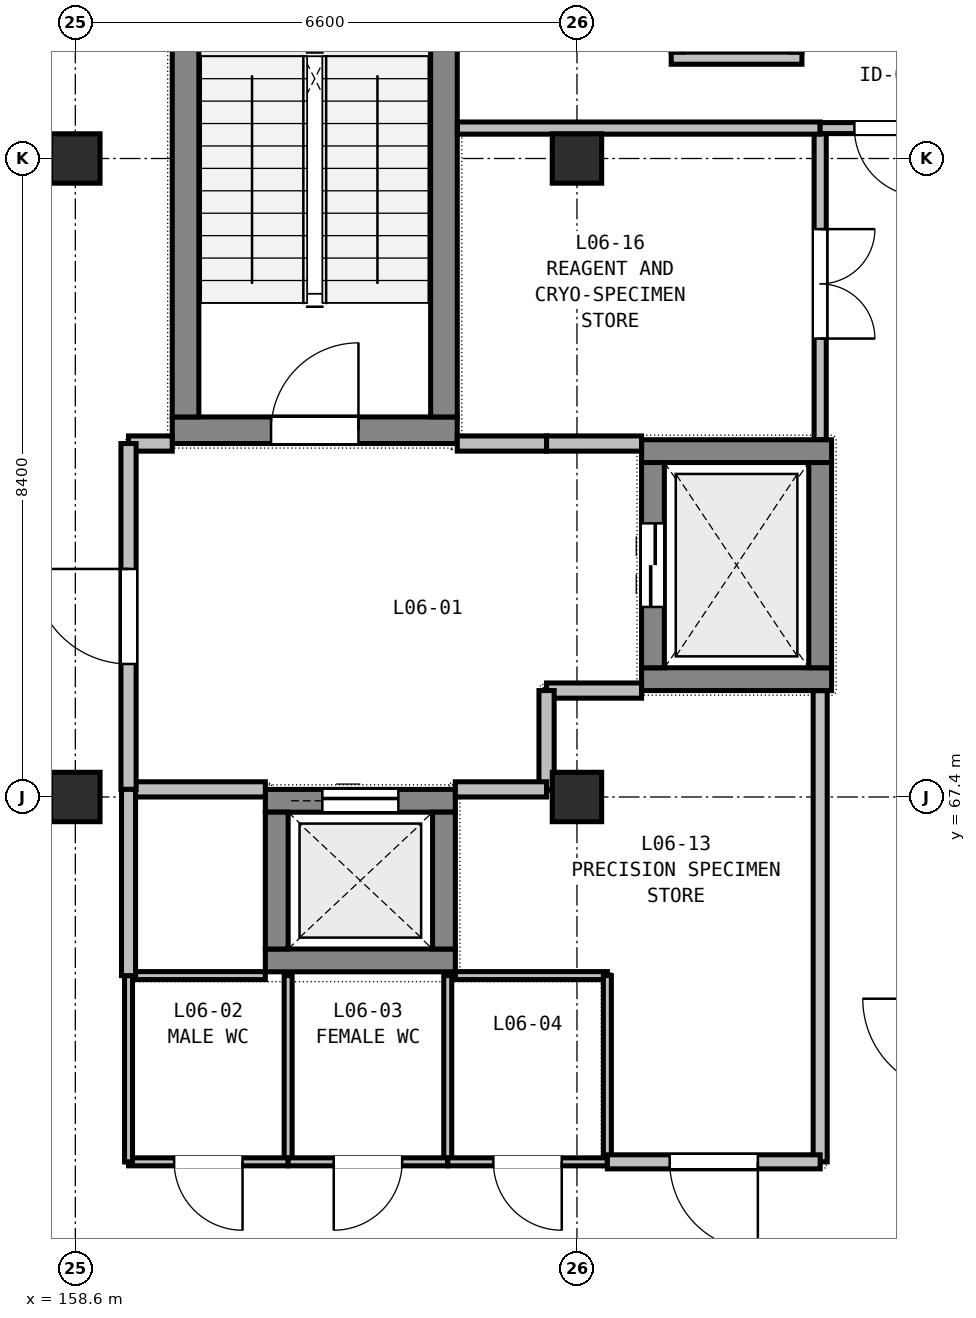
"""IFC4 building model, lengths in metres.
Left out: names, types, materials, properties, quantities, classifications, styles, units other than length and angle.
Written with IfcOpenShell. Run it as: python <this file> out.ifc"""

import sys

from ifc_helpers import new_model, si_unit, direction, frame, frame_2d, origin, origin_2d, place, context, subcontext, project, spatial, rectangle, extrude, element, fill, save


model = new_model("IFC4")
c1 = context("Model", 3, precision=1e-05, world=origin(), true_north=direction((0.0, 1.0)))
c2 = subcontext(c1, "Body", "Model", "MODEL_VIEW")
j1 = project(units=[si_unit("LENGTHUNIT", "METRE"), si_unit("PLANEANGLEUNIT", "RADIAN")], contexts=[c1])
p1 = place(None, origin())
s1 = spatial("IfcSite", under=j1, at=p1, CompositionType="ELEMENT")
p2 = place(p1, origin())
s2 = spatial("IfcBuilding", under=s1, at=p2, CompositionType="ELEMENT")
p3 = place(p2, frame((0.0, 0.0, 28.5)))
s3 = spatial("IfcBuildingStorey", under=s2, at=p3, CompositionType="ELEMENT", Elevation=28.5)
for number, where, z_axis, x_axis in (
    (1, (158.6, 67.4, 0.0), (0.0, 0.0, 1.0), (1.0, 0.0, 0.0)),
    (2, (158.6, 75.8, 0.0), (0.0, 0.0, 1.0), (1.0, 0.0, 0.0)),
    (3, (165.2, 67.4, 0.0), (0.0, 0.0, 1.0), (1.0, 0.0, 0.0)),
    (4, (165.2, 75.8, 0.0), (0.0, 0.0, 1.0), (1.0, 0.0, 0.0)),
):
    element("IfcColumn", number, at=place(p3, frame(where, z_axis=z_axis, x_axis=x_axis)), inside=s3, PredefinedType="COLUMN", context=c2, shape_type="SweptSolid", body=[
        extrude(rectangle(XDim=0.65, YDim=0.65, at=origin_2d()), origin(), (0.0, 0.0, 1.0), 4.2),
    ])
p4 = place(p3, frame((159.875, 72.225, 0.0), z_axis=(0.0, 0.0, 1.0), x_axis=(1.0, 0.0, 0.0)))
e5 = element("IfcWall", 5, at=p4, inside=s3, PredefinedType="SHEAR", context=c2, shape_type="SweptSolid", body=[
    extrude(rectangle(XDim=3.75, YDim=0.35, at=frame_2d((1.875, 0.0))), origin(), (0.0, 0.0, 1.0), 4.2),
])
p5 = place(p4, frame((1.3, 0.0, 0.0)))
e6 = element("IfcOpeningElement", 6, at=p5, cuts=e5, PredefinedType="OPENING", context=c2, shape_type="SweptSolid", body=[
    extrude(rectangle(XDim=1.15, YDim=2.15, at=frame_2d((0.575, 1.075))), frame((0.0, 0.185, 0.0), z_axis=(0.0, -1.0, 0.0), x_axis=(1.0, 0.0, 0.0)), (0.0, 0.0, 1.0), 0.37),
])
for number, where, z_axis, x_axis in (
    (7, (160.05, 72.4, 0.0), (0.0, 0.0, 1.0), (0.0, 1.0, 0.0)),
    (8, (163.45, 72.4, 0.0), (0.0, 0.0, 1.0), (0.0, 1.0, 0.0)),
):
    element("IfcWall", number, at=place(p3, frame(where, z_axis=z_axis, x_axis=x_axis)), inside=s3, PredefinedType="SHEAR", context=c2, shape_type="SweptSolid", body=[
        extrude(rectangle(XDim=7.375, YDim=0.35, at=frame_2d((3.688, 0.0))), origin(), (0.0, 0.0, 1.0), 4.2),
    ])
for number, where, z_axis, x_axis in (
    (9, (166.05, 68.95, 0.0), (0.0, 0.0, 1.0), (1.0, 0.0, 0.0)),
    (10, (166.05, 71.95, 0.0), (0.0, 0.0, 1.0), (1.0, 0.0, 0.0)),
):
    element("IfcWall", number, at=place(p3, frame(where, z_axis=z_axis, x_axis=x_axis)), inside=s3, PredefinedType="SHEAR", context=c2, shape_type="SweptSolid", body=[
        extrude(rectangle(XDim=2.5, YDim=0.3, at=frame_2d((1.25, 0.0))), origin(), (0.0, 0.0, 1.0), 4.2),
    ])
p6 = place(p3, frame((166.2, 69.1, 0.0), z_axis=(0.0, 0.0, 1.0), x_axis=(0.0, 1.0, 0.0)))
e11 = element("IfcWall", 11, at=p6, inside=s3, PredefinedType="SHEAR", context=c2, shape_type="SweptSolid", body=[
    extrude(rectangle(XDim=2.7, YDim=0.3, at=frame_2d((1.35, 0.0))), origin(), (0.0, 0.0, 1.0), 4.2),
])
p7 = place(p6, frame((0.8, 0.0, 0.0)))
e12 = element("IfcOpeningElement", 12, at=p7, cuts=e11, PredefinedType="OPENING", context=c2, shape_type="SweptSolid", body=[
    extrude(rectangle(XDim=1.1, YDim=2.1, at=frame_2d((0.55, 1.05))), frame((0.0, 0.16, 0.0), z_axis=(0.0, -1.0, 0.0), x_axis=(1.0, 0.0, 0.0)), (0.0, 0.0, 1.0), 0.32),
])
p8 = place(p3, frame((168.4, 69.1, 0.0), z_axis=(0.0, 0.0, 1.0), x_axis=(0.0, 1.0, 0.0)))
e13 = element("IfcWall", 13, at=p8, inside=s3, PredefinedType="SHEAR", context=c2, shape_type="SweptSolid", body=[
    extrude(rectangle(XDim=2.7, YDim=0.3, at=frame_2d((1.35, 0.0))), origin(), (0.0, 0.0, 1.0), 4.2),
])
p9 = place(p3, frame((161.1, 65.25, 0.0), z_axis=(0.0, 0.0, 1.0), x_axis=(1.0, 0.0, 0.0)))
e14 = element("IfcWall", 14, at=p9, inside=s3, PredefinedType="SHEAR", context=c2, shape_type="SweptSolid", body=[
    extrude(rectangle(XDim=2.5, YDim=0.3, at=frame_2d((1.25, 0.0))), origin(), (0.0, 0.0, 1.0), 4.2),
])
p10 = place(p3, frame((161.1, 67.35, 0.0), z_axis=(0.0, 0.0, 1.0), x_axis=(1.0, 0.0, 0.0)))
e15 = element("IfcWall", 15, at=p10, inside=s3, PredefinedType="SHEAR", context=c2, shape_type="SweptSolid", body=[
    extrude(rectangle(XDim=2.5, YDim=0.3, at=frame_2d((1.25, 0.0))), origin(), (0.0, 0.0, 1.0), 4.2),
])
p11 = place(p10, frame((0.75, 0.0, 0.0)))
e16 = element("IfcOpeningElement", 16, at=p11, cuts=e15, PredefinedType="OPENING", context=c2, shape_type="SweptSolid", body=[
    extrude(rectangle(XDim=1.0, YDim=2.1, at=frame_2d((0.5, 1.05))), frame((0.0, 0.16, 0.0), z_axis=(0.0, -1.0, 0.0), x_axis=(1.0, 0.0, 0.0)), (0.0, 0.0, 1.0), 0.32),
])
for number, where, z_axis, x_axis in (
    (17, (161.25, 65.4, 0.0), (0.0, 0.0, 1.0), (0.0, 1.0, 0.0)),
    (18, (163.45, 65.4, 0.0), (0.0, 0.0, 1.0), (0.0, 1.0, 0.0)),
):
    element("IfcWall", number, at=place(p3, frame(where, z_axis=z_axis, x_axis=x_axis)), inside=s3, PredefinedType="SHEAR", context=c2, shape_type="SweptSolid", body=[
        extrude(rectangle(XDim=1.8, YDim=0.3, at=frame_2d((0.9, 0.0))), origin(), (0.0, 0.0, 1.0), 4.2),
    ])
p12 = place(p3, frame((166.44, 77.12, 0.0), z_axis=(0.0, 0.0, 1.0), x_axis=(1.0, 0.0, 0.0)))
e19 = element("IfcWall", 19, at=p12, inside=s3, PredefinedType="PARTITIONING", context=c2, shape_type="SweptSolid", body=[
    extrude(rectangle(XDim=1.72, YDim=0.16, at=frame_2d((0.86, 0.0))), origin(), (0.0, 0.0, 1.0), 3.915),
])
p13 = place(p3, frame((159.3, 72.05, 0.0), z_axis=(0.0, 0.0, 1.0), x_axis=(1.0, 0.0, 0.0)))
e20 = element("IfcWall", 20, at=p13, inside=s3, PredefinedType="PARTITIONING", context=c2, shape_type="SweptSolid", body=[
    extrude(rectangle(XDim=0.575, YDim=0.2, at=frame_2d((0.288, 0.0))), origin(), (0.0, 0.0, 1.0), 3.915),
])
p14 = place(p3, frame((163.625, 72.05, 0.0), z_axis=(0.0, 0.0, 1.0), x_axis=(1.0, 0.0, 0.0)))
e21 = element("IfcWall", 21, at=p14, inside=s3, PredefinedType="PARTITIONING", context=c2, shape_type="SweptSolid", body=[
    extrude(rectangle(XDim=1.175, YDim=0.2, at=frame_2d((0.587, 0.0))), origin(), (0.0, 0.0, 1.0), 3.915),
])
for number, where, z_axis, x_axis in (
    (22, (164.8, 72.05, 0.0), (0.0, 0.0, 1.0), (1.0, 0.0, 0.0)),
    (23, (166.05, 68.8, 0.0), (0.0, 0.0, 1.0), (-1.0, 0.0, 0.0)),
):
    element("IfcWall", number, at=place(p3, frame(where, z_axis=z_axis, x_axis=x_axis)), inside=s3, PredefinedType="PARTITIONING", context=c2, shape_type="SweptSolid", body=[
        extrude(rectangle(XDim=1.25, YDim=0.2, at=frame_2d((0.625, 0.0))), origin(), (0.0, 0.0, 1.0), 3.435),
    ])
p15 = place(p3, frame((164.8, 68.8, 0.0), z_axis=(0.0, 0.0, 1.0), x_axis=(0.0, -1.0, 0.0)))
e24 = element("IfcWall", 24, at=p15, inside=s3, PredefinedType="PARTITIONING", context=c2, shape_type="SweptSolid", body=[
    extrude(rectangle(XDim=1.3, YDim=0.2, at=frame_2d((0.65, 0.0))), origin(), (0.0, 0.0, 1.0), 3.585),
])
p16 = place(p3, frame((164.8, 67.5, 0.0), z_axis=(0.0, 0.0, 1.0), x_axis=(-1.0, 0.0, 0.0)))
e25 = element("IfcWall", 25, at=p16, inside=s3, PredefinedType="PARTITIONING", context=c2, shape_type="SweptSolid", body=[
    extrude(rectangle(XDim=1.2, YDim=0.2, at=frame_2d((0.6, 0.0))), origin(), (0.0, 0.0, 1.0), 3.585),
])
p17 = place(p3, frame((161.1, 67.5, 0.0), z_axis=(0.0, 0.0, 1.0), x_axis=(-1.0, 0.0, 0.0)))
e26 = element("IfcWall", 26, at=p17, inside=s3, PredefinedType="PARTITIONING", context=c2, shape_type="SweptSolid", body=[
    extrude(rectangle(XDim=1.8, YDim=0.2, at=frame_2d((0.9, 0.0))), origin(), (0.0, 0.0, 1.0), 3.585),
])
p18 = place(p3, frame((159.3, 67.5, 0.0), z_axis=(0.0, 0.0, 1.0), x_axis=(0.0, 1.0, 0.0)))
e27 = element("IfcWall", 27, at=p18, inside=s3, PredefinedType="PARTITIONING", context=c2, shape_type="SweptSolid", body=[
    extrude(rectangle(XDim=4.55, YDim=0.2, at=frame_2d((2.275, 0.0))), origin(), (0.0, 0.0, 1.0), 3.585),
])
p19 = place(p18, frame((1.65, 0.0, 0.0)))
e28 = element("IfcOpeningElement", 28, at=p19, cuts=e27, PredefinedType="OPENING", context=c2, shape_type="SweptSolid", body=[
    extrude(rectangle(XDim=1.25, YDim=2.15, at=frame_2d((0.625, 1.075))), frame((0.0, 0.11, 0.0), z_axis=(0.0, -1.0, 0.0), x_axis=(1.0, 0.0, 0.0)), (0.0, 0.0, 1.0), 0.22),
])
p20 = place(p3, frame((159.3, 65.05, 0.0), z_axis=(0.0, 0.0, 1.0), x_axis=(1.0, 0.0, 0.0)))
e29 = element("IfcWall", 29, at=p20, inside=s3, PredefinedType="PARTITIONING", context=c2, shape_type="SweptSolid", body=[
    extrude(rectangle(XDim=1.8, YDim=0.105, at=frame_2d((0.9, 0.0))), origin(), (0.0, 0.0, 1.0), 3.915),
])
p21 = place(p3, frame((161.4, 65.05, 0.0), z_axis=(0.0, 0.0, 1.0), x_axis=(0.0, -1.0, 0.0)))
e30 = element("IfcWall", 30, at=p21, inside=s3, PredefinedType="PARTITIONING", context=c2, shape_type="SweptSolid", body=[
    extrude(rectangle(XDim=2.45, YDim=0.105, at=frame_2d((1.225, 0.0))), origin(), (0.0, 0.0, 1.0), 3.915),
])
p22 = place(p3, frame((161.4, 62.6, 0.0), z_axis=(0.0, 0.0, 1.0), x_axis=(-1.0, 0.0, 0.0)))
e31 = element("IfcWall", 31, at=p22, inside=s3, PredefinedType="PARTITIONING", context=c2, shape_type="SweptSolid", body=[
    extrude(rectangle(XDim=2.1, YDim=0.105, at=frame_2d((1.05, 0.0))), origin(), (0.0, 0.0, 1.0), 3.915),
])
p23 = place(p22, frame((0.6, 0.0, 0.0)))
e32 = element("IfcOpeningElement", 32, at=p23, cuts=e31, PredefinedType="OPENING", context=c2, shape_type="SweptSolid", body=[
    extrude(rectangle(XDim=0.9, YDim=2.02, at=frame_2d((0.45, 1.01))), frame((0.0, 0.062, 0.0), z_axis=(0.0, -1.0, 0.0), x_axis=(1.0, 0.0, 0.0)), (0.0, 0.0, 1.0), 0.125),
])
for number, where, z_axis, x_axis in (
    (33, (159.3, 62.6, 0.0), (0.0, 0.0, 1.0), (0.0, 1.0, 0.0)),
    (34, (163.5, 65.05, 0.0), (0.0, 0.0, 1.0), (0.0, -1.0, 0.0)),
):
    element("IfcWall", number, at=place(p3, frame(where, z_axis=z_axis, x_axis=x_axis)), inside=s3, PredefinedType="PARTITIONING", context=c2, shape_type="SweptSolid", body=[
        extrude(rectangle(XDim=2.45, YDim=0.105, at=frame_2d((1.225, 0.0))), origin(), (0.0, 0.0, 1.0), 3.915),
    ])
p24 = place(p3, frame((163.5, 62.6, 0.0), z_axis=(0.0, 0.0, 1.0), x_axis=(-1.0, 0.0, 0.0)))
e35 = element("IfcWall", 35, at=p24, inside=s3, PredefinedType="PARTITIONING", context=c2, shape_type="SweptSolid", body=[
    extrude(rectangle(XDim=2.1, YDim=0.105, at=frame_2d((1.05, 0.0))), origin(), (0.0, 0.0, 1.0), 3.915),
])
p25 = place(p24, frame((0.6, 0.0, 0.0)))
e36 = element("IfcOpeningElement", 36, at=p25, cuts=e35, PredefinedType="OPENING", context=c2, shape_type="SweptSolid", body=[
    extrude(rectangle(XDim=0.9, YDim=2.02, at=frame_2d((0.45, 1.01))), frame((0.0, 0.062, 0.0), z_axis=(0.0, -1.0, 0.0), x_axis=(1.0, 0.0, 0.0)), (0.0, 0.0, 1.0), 0.125),
])
p26 = place(p3, frame((163.6, 65.05, 0.0), z_axis=(0.0, 0.0, 1.0), x_axis=(1.0, 0.0, 0.0)))
e37 = element("IfcWall", 37, at=p26, inside=s3, PredefinedType="PARTITIONING", context=c2, shape_type="SweptSolid", body=[
    extrude(rectangle(XDim=2.0, YDim=0.105, at=frame_2d((1.0, 0.0))), origin(), (0.0, 0.0, 1.0), 3.435),
])
p27 = place(p3, frame((165.6, 65.05, 0.0), z_axis=(0.0, 0.0, 1.0), x_axis=(0.0, -1.0, 0.0)))
e38 = element("IfcWall", 38, at=p27, inside=s3, PredefinedType="PARTITIONING", context=c2, shape_type="SweptSolid", body=[
    extrude(rectangle(XDim=2.45, YDim=0.105, at=frame_2d((1.225, 0.0))), origin(), (0.0, 0.0, 1.0), 3.915),
])
p28 = place(p3, frame((165.6, 62.6, 0.0), z_axis=(0.0, 0.0, 1.0), x_axis=(-1.0, 0.0, 0.0)))
e39 = element("IfcWall", 39, at=p28, inside=s3, PredefinedType="PARTITIONING", context=c2, shape_type="SweptSolid", body=[
    extrude(rectangle(XDim=2.1, YDim=0.105, at=frame_2d((1.05, 0.0))), origin(), (0.0, 0.0, 1.0), 3.435),
])
p29 = place(p28, frame((0.6, 0.0, 0.0)))
e40 = element("IfcOpeningElement", 40, at=p29, cuts=e39, PredefinedType="OPENING", context=c2, shape_type="SweptSolid", body=[
    extrude(rectangle(XDim=0.9, YDim=2.02, at=frame_2d((0.45, 1.01))), frame((0.0, 0.062, 0.0), z_axis=(0.0, -1.0, 0.0), x_axis=(1.0, 0.0, 0.0)), (0.0, 0.0, 1.0), 0.125),
])
p30 = place(p3, frame((168.4, 68.798, 0.0), z_axis=(0.0, 0.0, 1.0), x_axis=(0.0, -1.0, 0.0)))
e41 = element("IfcWall", 41, at=p30, inside=s3, PredefinedType="PARTITIONING", context=c2, shape_type="SweptSolid", body=[
    extrude(rectangle(XDim=6.198, YDim=0.185, at=frame_2d((3.099, 0.0))), origin(), (0.0, 0.0, 1.0), 3.585),
])
p31 = place(p3, frame((168.4, 62.6, 0.0), z_axis=(0.0, 0.0, 1.0), x_axis=(-1.0, 0.0, 0.0)))
e42 = element("IfcWall", 42, at=p31, inside=s3, PredefinedType="PARTITIONING", context=c2, shape_type="SweptSolid", body=[
    extrude(rectangle(XDim=2.8, YDim=0.185, at=frame_2d((1.4, 0.0))), origin(), (0.0, 0.0, 1.0), 3.735),
])
p32 = place(p31, frame((0.82, 0.0, 0.0)))
e43 = element("IfcOpeningElement", 43, at=p32, cuts=e42, PredefinedType="OPENING", context=c2, shape_type="SweptSolid", body=[
    extrude(rectangle(XDim=1.16, YDim=2.14, at=frame_2d((0.58, 1.07))), frame((0.0, 0.103, 0.0), z_axis=(0.0, -1.0, 0.0), x_axis=(1.0, 0.0, 0.0)), (0.0, 0.0, 1.0), 0.205),
])
p33 = place(p3, frame((159.3, 65.05, 0.0), z_axis=(0.0, 0.0, 1.0), x_axis=(0.0, 1.0, 0.0)))
e44 = element("IfcWall", 44, at=p33, inside=s3, PredefinedType="PARTITIONING", context=c2, shape_type="SweptSolid", body=[
    extrude(rectangle(XDim=2.45, YDim=0.185, at=frame_2d((1.225, 0.0))), origin(), (0.0, 0.0, 1.0), 3.585),
])
p34 = place(p3, frame((168.4, 76.2, 0.0), z_axis=(0.0, 0.0, 1.0), x_axis=(0.0, -1.0, 0.0)))
e45 = element("IfcWall", 45, at=p34, inside=s3, PredefinedType="PARTITIONING", context=c2, shape_type="SweptSolid", body=[
    extrude(rectangle(XDim=4.098, YDim=0.16, at=frame_2d((2.049, 0.0))), origin(), (0.0, 0.0, 1.0), 3.585),
])
p35 = place(p34, frame((1.329, 0.0, 0.0)))
e46 = element("IfcOpeningElement", 46, at=p35, cuts=e45, PredefinedType="OPENING", context=c2, shape_type="SweptSolid", body=[
    extrude(rectangle(XDim=1.44, YDim=2.14, at=frame_2d((0.72, 1.07))), frame((0.0, 0.09, 0.0), z_axis=(0.0, -1.0, 0.0), x_axis=(1.0, 0.0, 0.0)), (0.0, 0.0, 1.0), 0.18),
])
p36 = place(p3, frame((163.627, 76.2, 0.0), z_axis=(0.0, 0.0, 1.0), x_axis=(1.0, 0.0, 0.0)))
e47 = element("IfcWall", 47, at=p36, inside=s3, PredefinedType="PARTITIONING", context=c2, shape_type="SweptSolid", body=[
    extrude(rectangle(XDim=4.773, YDim=0.16, at=frame_2d((2.386, 0.0))), origin(), (0.0, 0.0, 1.0), 3.435),
])
p37 = place(p3, frame((170.2, 76.2, 0.0), z_axis=(0.0, 0.0, 1.0), x_axis=(-1.0, 0.0, 0.0)))
e48 = element("IfcWall", 48, at=p37, inside=s3, PredefinedType="PARTITIONING", context=c2, shape_type="SweptSolid", body=[
    extrude(rectangle(XDim=1.8, YDim=0.145, at=frame_2d((0.9, 0.0))), origin(), (0.0, 0.0, 1.0), 3.735),
])
p38 = place(p37, frame((0.45, 0.0, 0.0)))
e49 = element("IfcOpeningElement", 49, at=p38, cuts=e48, PredefinedType="OPENING", context=c2, shape_type="SweptSolid", body=[
    extrude(rectangle(XDim=0.9, YDim=2.02, at=frame_2d((0.45, 1.01))), frame((0.0, 0.083, 0.0), z_axis=(0.0, -1.0, 0.0), x_axis=(1.0, 0.0, 0.0)), (0.0, 0.0, 1.0), 0.165),
])
p39 = place(p5, origin())
e50 = element("IfcDoor", 50, at=p39, inside=s3, OperationType="SINGLE_SWING_RIGHT", PredefinedType="DOOR", context=c2, shape_type="SweptSolid", body=[
    extrude(rectangle(XDim=1.15, YDim=2.15, at=frame_2d((0.575, 1.075))), frame((0.0, 0.025, 0.0), z_axis=(0.0, -1.0, 0.0), x_axis=(1.0, 0.0, 0.0)), (0.0, 0.0, 1.0), 0.05),
])
fill(e6, e50)
p40 = place(p7, origin())
e51 = element("IfcDoor", 51, at=p40, inside=s3, OperationType="DOUBLE_DOOR_SLIDING", PredefinedType="DOOR", context=c2, shape_type="SweptSolid", body=[
    extrude(rectangle(XDim=1.1, YDim=2.1, at=frame_2d((0.55, 1.05))), frame((0.0, 0.025, 0.0), z_axis=(0.0, -1.0, 0.0), x_axis=(1.0, 0.0, 0.0)), (0.0, 0.0, 1.0), 0.05),
])
fill(e12, e51)
p41 = place(p11, origin())
e52 = element("IfcDoor", 52, at=p41, inside=s3, OperationType="SLIDING_TO_LEFT", PredefinedType="DOOR", context=c2, shape_type="SweptSolid", body=[
    extrude(rectangle(XDim=1.0, YDim=2.1, at=frame_2d((0.5, 1.05))), frame((0.0, 0.025, 0.0), z_axis=(0.0, -1.0, 0.0), x_axis=(1.0, 0.0, 0.0)), (0.0, 0.0, 1.0), 0.05),
])
fill(e16, e52)
p42 = place(p19, origin())
e53 = element("IfcDoor", 53, at=p42, inside=s3, OperationType="SINGLE_SWING_RIGHT", PredefinedType="DOOR", context=c2, shape_type="SweptSolid", body=[
    extrude(rectangle(XDim=1.25, YDim=2.15, at=frame_2d((0.625, 1.075))), frame((0.0, 0.025, 0.0), z_axis=(0.0, -1.0, 0.0), x_axis=(1.0, 0.0, 0.0)), (0.0, 0.0, 1.0), 0.05),
])
fill(e28, e53)
p43 = place(p23, origin())
e54 = element("IfcDoor", 54, at=p43, inside=s3, OperationType="SINGLE_SWING_LEFT", PredefinedType="DOOR", context=c2, shape_type="SweptSolid", body=[
    extrude(rectangle(XDim=0.9, YDim=2.02, at=frame_2d((0.45, 1.01))), frame((0.0, 0.025, 0.0), z_axis=(0.0, -1.0, 0.0), x_axis=(1.0, 0.0, 0.0)), (0.0, 0.0, 1.0), 0.05),
])
fill(e32, e54)
p44 = place(p25, origin())
e55 = element("IfcDoor", 55, at=p44, inside=s3, OperationType="SINGLE_SWING_RIGHT", PredefinedType="DOOR", context=c2, shape_type="SweptSolid", body=[
    extrude(rectangle(XDim=0.9, YDim=2.02, at=frame_2d((0.45, 1.01))), frame((0.0, 0.025, 0.0), z_axis=(0.0, -1.0, 0.0), x_axis=(1.0, 0.0, 0.0)), (0.0, 0.0, 1.0), 0.05),
])
fill(e36, e55)
p45 = place(p29, origin())
e56 = element("IfcDoor", 56, at=p45, inside=s3, OperationType="SINGLE_SWING_LEFT", PredefinedType="DOOR", context=c2, shape_type="SweptSolid", body=[
    extrude(rectangle(XDim=0.9, YDim=2.02, at=frame_2d((0.45, 1.01))), frame((0.0, 0.025, 0.0), z_axis=(0.0, -1.0, 0.0), x_axis=(1.0, 0.0, 0.0)), (0.0, 0.0, 1.0), 0.05),
])
fill(e40, e56)
p46 = place(p32, origin())
e57 = element("IfcDoor", 57, at=p46, inside=s3, OperationType="SINGLE_SWING_LEFT", PredefinedType="DOOR", context=c2, shape_type="SweptSolid", body=[
    extrude(rectangle(XDim=1.16, YDim=2.14, at=frame_2d((0.58, 1.07))), frame((0.0, 0.025, 0.0), z_axis=(0.0, -1.0, 0.0), x_axis=(1.0, 0.0, 0.0)), (0.0, 0.0, 1.0), 0.05),
])
fill(e43, e57)
p47 = place(p35, origin())
e58 = element("IfcDoor", 58, at=p47, inside=s3, OperationType="DOUBLE_DOOR_SINGLE_SWING", PredefinedType="DOOR", context=c2, shape_type="SweptSolid", body=[
    extrude(rectangle(XDim=1.44, YDim=2.14, at=frame_2d((0.72, 1.07))), frame((0.0, 0.025, 0.0), z_axis=(0.0, -1.0, 0.0), x_axis=(1.0, 0.0, 0.0)), (0.0, 0.0, 1.0), 0.05),
])
fill(e46, e58)
p48 = place(p38, origin())
e59 = element("IfcDoor", 59, at=p48, inside=s3, OperationType="SINGLE_SWING_LEFT", PredefinedType="DOOR", context=c2, shape_type="SweptSolid", body=[
    extrude(rectangle(XDim=0.9, YDim=2.02, at=frame_2d((0.45, 1.01))), frame((0.0, 0.025, 0.0), z_axis=(0.0, -1.0, 0.0), x_axis=(1.0, 0.0, 0.0)), (0.0, 0.0, 1.0), 0.05),
])
fill(e49, e59)
save(model, sys.argv[1])
